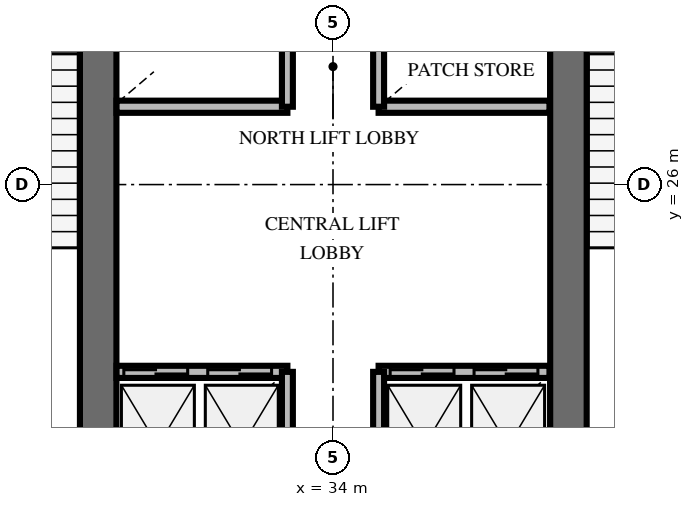
"""IFC4 building model, lengths in metres.
Left out: names, types, materials, properties, quantities, classifications, styles, units other than length and angle.
Written with IfcOpenShell. Run it as: python <this file> out.ifc"""

import sys

from ifc_helpers import new_model, si_unit, direction, frame, frame_2d, origin, place, context, subcontext, project, spatial, rectangle, extrude, element, fill, save


model = new_model("IFC4")
c1 = context("Model", 3, precision=1e-05, world=origin(), true_north=direction((0.0, 1.0)))
c2 = subcontext(c1, "Body", "Model", "MODEL_VIEW")
j1 = project(units=[si_unit("LENGTHUNIT", "METRE"), si_unit("PLANEANGLEUNIT", "RADIAN")], contexts=[c1])
p1 = place(None, origin())
s1 = spatial("IfcSite", under=j1, at=p1, CompositionType="ELEMENT")
p2 = place(p1, origin())
s2 = spatial("IfcBuilding", under=s1, at=p2, CompositionType="ELEMENT")
p3 = place(p2, frame((0.0, 0.0, 34.2)))
s3 = spatial("IfcBuildingStorey", under=s2, at=p3, CompositionType="ELEMENT", Elevation=34.2)
for number, where, z_axis, x_axis in (
    (1, (30.138, 20.112, 0.0), (0.0, 0.0, 1.0), (0.0, 1.0, 0.0)),
    (2, (37.872, 20.112, 0.0), (0.0, 0.0, 1.0), (0.0, 1.0, 0.0)),
):
    element("IfcWall", number, at=place(p3, frame(where, z_axis=z_axis, x_axis=x_axis)), inside=s3, PredefinedType="SHEAR", context=c2, shape_type="SweptSolid", body=[
        extrude(rectangle(XDim=9.976, YDim=0.6, at=frame_2d((4.988, 0.0))), origin(), (0.0, 0.0, 1.0), 4.2),
    ])
p4 = place(p3, frame((30.44, 22.92, 0.0), z_axis=(0.0, 0.0, 1.0), x_axis=(1.0, 0.0, 0.0)))
e3 = element("IfcWall", 3, at=p4, inside=s3, PredefinedType="SOLIDWALL", context=c2, shape_type="SweptSolid", body=[
    extrude(rectangle(XDim=2.81, YDim=0.2, at=frame_2d((1.405, 0.0))), origin(), (0.0, 0.0, 1.0), 3.0),
])
p5 = place(p4, frame((0.12, 0.0, 0.0)))
e4 = element("IfcOpeningElement", 4, at=p5, cuts=e3, PredefinedType="OPENING", context=c2, shape_type="SweptSolid", body=[
    extrude(rectangle(XDim=1.05, YDim=2.1, at=frame_2d((0.525, 1.05))), frame((0.0, 0.11, 0.0), z_axis=(0.0, -1.0, 0.0), x_axis=(1.0, 0.0, 0.0)), (0.0, 0.0, 1.0), 0.22),
])
p6 = place(p4, frame((1.5, 0.0, 0.0)))
e5 = element("IfcOpeningElement", 5, at=p6, cuts=e3, PredefinedType="OPENING", context=c2, shape_type="SweptSolid", body=[
    extrude(rectangle(XDim=1.05, YDim=2.1, at=frame_2d((0.525, 1.05))), frame((0.0, 0.11, 0.0), z_axis=(0.0, -1.0, 0.0), x_axis=(1.0, 0.0, 0.0)), (0.0, 0.0, 1.0), 0.22),
])
p7 = place(p3, frame((33.25, 20.5, 0.0), z_axis=(0.0, 0.0, 1.0), x_axis=(0.0, 1.0, 0.0)))
e6 = element("IfcWall", 6, at=p7, inside=s3, PredefinedType="SOLIDWALL", context=c2, shape_type="SweptSolid", body=[
    extrude(rectangle(XDim=2.42, YDim=0.18, at=frame_2d((1.21, 0.0))), origin(), (0.0, 0.0, 1.0), 3.0),
])
p8 = place(p3, frame((34.75, 22.92, 0.0), z_axis=(0.0, 0.0, 1.0), x_axis=(1.0, 0.0, 0.0)))
e7 = element("IfcWall", 7, at=p8, inside=s3, PredefinedType="SOLIDWALL", context=c2, shape_type="SweptSolid", body=[
    extrude(rectangle(XDim=2.81, YDim=0.2, at=frame_2d((1.405, 0.0))), origin(), (0.0, 0.0, 1.0), 3.0),
])
p9 = place(p8, frame((0.19, 0.0, 0.0)))
e8 = element("IfcOpeningElement", 8, at=p9, cuts=e7, PredefinedType="OPENING", context=c2, shape_type="SweptSolid", body=[
    extrude(rectangle(XDim=1.05, YDim=2.1, at=frame_2d((0.525, 1.05))), frame((0.0, 0.11, 0.0), z_axis=(0.0, -1.0, 0.0), x_axis=(1.0, 0.0, 0.0)), (0.0, 0.0, 1.0), 0.22),
])
p10 = place(p8, frame((1.57, 0.0, 0.0)))
e9 = element("IfcOpeningElement", 9, at=p10, cuts=e7, PredefinedType="OPENING", context=c2, shape_type="SweptSolid", body=[
    extrude(rectangle(XDim=1.05, YDim=2.1, at=frame_2d((0.525, 1.05))), frame((0.0, 0.11, 0.0), z_axis=(0.0, -1.0, 0.0), x_axis=(1.0, 0.0, 0.0)), (0.0, 0.0, 1.0), 0.22),
])
p11 = place(p3, frame((34.75, 20.5, 0.0), z_axis=(0.0, 0.0, 1.0), x_axis=(0.0, 1.0, 0.0)))
e10 = element("IfcWall", 10, at=p11, inside=s3, PredefinedType="SOLIDWALL", context=c2, shape_type="SweptSolid", body=[
    extrude(rectangle(XDim=2.42, YDim=0.18, at=frame_2d((1.21, 0.0))), origin(), (0.0, 0.0, 1.0), 3.0),
])
p12 = place(p3, frame((30.44, 27.28, 0.0), z_axis=(0.0, 0.0, 1.0), x_axis=(1.0, 0.0, 0.0)))
e11 = element("IfcWall", 11, at=p12, inside=s3, PredefinedType="SOLIDWALL", context=c2, shape_type="SweptSolid", body=[
    extrude(rectangle(XDim=2.81, YDim=0.2, at=frame_2d((1.405, 0.0))), origin(), (0.0, 0.0, 1.0), 3.0),
])
p13 = place(p3, frame((33.25, 27.28, 0.0), z_axis=(0.0, 0.0, 1.0), x_axis=(0.0, 1.0, 0.0)))
e12 = element("IfcWall", 12, at=p13, inside=s3, PredefinedType="SOLIDWALL", context=c2, shape_type="SweptSolid", body=[
    extrude(rectangle(XDim=2.47, YDim=0.18, at=frame_2d((1.235, 0.0))), origin(), (0.0, 0.0, 1.0), 3.0),
])
p14 = place(p3, frame((34.75, 27.28, 0.0), z_axis=(0.0, 0.0, 1.0), x_axis=(1.0, 0.0, 0.0)))
e13 = element("IfcWall", 13, at=p14, inside=s3, PredefinedType="SOLIDWALL", context=c2, shape_type="SweptSolid", body=[
    extrude(rectangle(XDim=2.81, YDim=0.2, at=frame_2d((1.405, 0.0))), origin(), (0.0, 0.0, 1.0), 3.0),
])
p15 = place(p3, frame((34.75, 27.28, 0.0), z_axis=(0.0, 0.0, 1.0), x_axis=(0.0, 1.0, 0.0)))
e14 = element("IfcWall", 14, at=p15, inside=s3, PredefinedType="SOLIDWALL", context=c2, shape_type="SweptSolid", body=[
    extrude(rectangle(XDim=2.47, YDim=0.18, at=frame_2d((1.235, 0.0))), origin(), (0.0, 0.0, 1.0), 3.0),
])
p16 = place(p5, origin())
e15 = element("IfcDoor", 15, at=p16, inside=s3, OperationType="DOUBLE_DOOR_SLIDING", PredefinedType="USERDEFINED", context=c2, shape_type="SweptSolid", body=[
    extrude(rectangle(XDim=1.05, YDim=2.1, at=frame_2d((0.525, 1.05))), frame((0.0, 0.025, 0.0), z_axis=(0.0, -1.0, 0.0), x_axis=(1.0, 0.0, 0.0)), (0.0, 0.0, 1.0), 0.05),
])
fill(e4, e15)
p17 = place(p6, origin())
e16 = element("IfcDoor", 16, at=p17, inside=s3, OperationType="DOUBLE_DOOR_SLIDING", PredefinedType="USERDEFINED", context=c2, shape_type="SweptSolid", body=[
    extrude(rectangle(XDim=1.05, YDim=2.1, at=frame_2d((0.525, 1.05))), frame((0.0, 0.025, 0.0), z_axis=(0.0, -1.0, 0.0), x_axis=(1.0, 0.0, 0.0)), (0.0, 0.0, 1.0), 0.05),
])
fill(e5, e16)
p18 = place(p9, origin())
e17 = element("IfcDoor", 17, at=p18, inside=s3, OperationType="DOUBLE_DOOR_SLIDING", PredefinedType="USERDEFINED", context=c2, shape_type="SweptSolid", body=[
    extrude(rectangle(XDim=1.05, YDim=2.1, at=frame_2d((0.525, 1.05))), frame((0.0, 0.025, 0.0), z_axis=(0.0, -1.0, 0.0), x_axis=(1.0, 0.0, 0.0)), (0.0, 0.0, 1.0), 0.05),
])
fill(e8, e17)
p19 = place(p10, origin())
e18 = element("IfcDoor", 18, at=p19, inside=s3, OperationType="DOUBLE_DOOR_SLIDING", PredefinedType="USERDEFINED", context=c2, shape_type="SweptSolid", body=[
    extrude(rectangle(XDim=1.05, YDim=2.1, at=frame_2d((0.525, 1.05))), frame((0.0, 0.025, 0.0), z_axis=(0.0, -1.0, 0.0), x_axis=(1.0, 0.0, 0.0)), (0.0, 0.0, 1.0), 0.05),
])
fill(e9, e18)
save(model, sys.argv[1])
